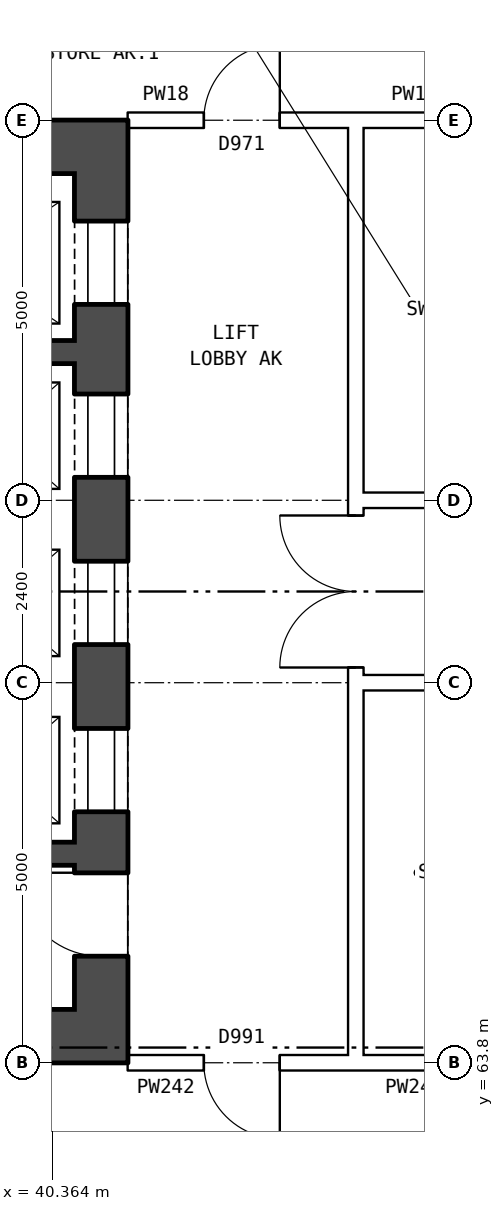
"""IFC4 building model, lengths in metres.
Left out: names, types, materials, properties, quantities, classifications, styles, units other than length and angle.
Written with IfcOpenShell. Run it as: python <this file> out.ifc"""

import sys

from ifc_helpers import new_model, si_unit, direction, frame, frame_2d, origin, place, context, subcontext, project, spatial, rectangle, extrude, element, fill, save


model = new_model("IFC4")
c1 = context("Model", 3, precision=1e-05, world=origin(), true_north=direction((0.0, 1.0)))
c2 = subcontext(c1, "Body", "Model", "MODEL_VIEW")
j1 = project(units=[si_unit("LENGTHUNIT", "METRE"), si_unit("PLANEANGLEUNIT", "RADIAN")], contexts=[c1])
p1 = place(None, origin())
s1 = spatial("IfcSite", under=j1, at=p1, CompositionType="ELEMENT")
p2 = place(p1, origin())
s2 = spatial("IfcBuilding", under=s1, at=p2, CompositionType="ELEMENT")
p3 = place(p2, frame((0.0, 0.0, 80.9)))
s3 = spatial("IfcBuildingStorey", under=s2, at=p3, CompositionType="ELEMENT", Elevation=80.9)
p4 = place(p3, frame((41.01, 75.5, 0.0), z_axis=(0.0, 0.0, 1.0), x_axis=(0.0, -1.0, 0.0)))
e1 = element("IfcWall", 1, at=p4, inside=s3, PredefinedType="SHEAR", context=c2, shape_type="SweptSolid", body=[
    extrude(rectangle(XDim=11.0, YDim=0.7, at=frame_2d((5.5, 0.0))), origin(), (0.0, 0.0, 1.0), 2.85),
])
p5 = place(p4, frame((0.625, 0.0, 0.0)))
e2 = element("IfcOpeningElement", 2, at=p5, cuts=e1, PredefinedType="OPENING", context=c2, shape_type="SweptSolid", body=[
    extrude(rectangle(XDim=1.1, YDim=2.1, at=frame_2d((0.55, 1.05))), frame((0.0, 0.36, 0.0), z_axis=(0.0, -1.0, 0.0), x_axis=(1.0, 0.0, 0.0)), (0.0, 0.0, 1.0), 0.72),
])
p6 = place(p4, frame((2.9, 0.0, 0.0)))
e3 = element("IfcOpeningElement", 3, at=p6, cuts=e1, PredefinedType="OPENING", context=c2, shape_type="SweptSolid", body=[
    extrude(rectangle(XDim=1.1, YDim=2.1, at=frame_2d((0.55, 1.05))), frame((0.0, 0.36, 0.0), z_axis=(0.0, -1.0, 0.0), x_axis=(1.0, 0.0, 0.0)), (0.0, 0.0, 1.0), 0.72),
])
p7 = place(p4, frame((5.1, 0.0, 0.0)))
e4 = element("IfcOpeningElement", 4, at=p7, cuts=e1, PredefinedType="OPENING", context=c2, shape_type="SweptSolid", body=[
    extrude(rectangle(XDim=1.1, YDim=2.1, at=frame_2d((0.55, 1.05))), frame((0.0, 0.36, 0.0), z_axis=(0.0, -1.0, 0.0), x_axis=(1.0, 0.0, 0.0)), (0.0, 0.0, 1.0), 0.72),
])
p8 = place(p4, frame((7.3, 0.0, 0.0)))
e5 = element("IfcOpeningElement", 5, at=p8, cuts=e1, PredefinedType="OPENING", context=c2, shape_type="SweptSolid", body=[
    extrude(rectangle(XDim=1.1, YDim=2.1, at=frame_2d((0.55, 1.05))), frame((0.0, 0.36, 0.0), z_axis=(0.0, -1.0, 0.0), x_axis=(1.0, 0.0, 0.0)), (0.0, 0.0, 1.0), 0.72),
])
p9 = place(p4, frame((9.2, 0.0, 0.0)))
e6 = element("IfcOpeningElement", 6, at=p9, cuts=e1, PredefinedType="OPENING", context=c2, shape_type="SweptSolid", body=[
    extrude(rectangle(XDim=1.1, YDim=2.1, at=frame_2d((0.55, 1.05))), frame((0.0, 0.36, 0.0), z_axis=(0.0, -1.0, 0.0), x_axis=(1.0, 0.0, 0.0)), (0.0, 0.0, 1.0), 0.72),
])
for number, where, z_axis, x_axis in (
    (7, (41.36, 75.85, 0.0), (0.0, 0.0, 1.0), (-1.0, 0.0, 0.0)),
    (8, (41.36, 64.15, 0.0), (0.0, 0.0, 1.0), (-1.0, 0.0, 0.0)),
):
    element("IfcWall", number, at=place(p3, frame(where, z_axis=z_axis, x_axis=x_axis)), inside=s3, PredefinedType="SHEAR", context=c2, shape_type="SweptSolid", body=[
        extrude(rectangle(XDim=9.0, YDim=0.7, at=frame_2d((4.5, 0.0))), origin(), (0.0, 0.0, 1.0), 2.85),
    ])
p10 = place(p3, frame((40.66, 73.15, 0.0), z_axis=(0.0, 0.0, 1.0), x_axis=(-1.0, 0.0, 0.0)))
e9 = element("IfcWall", 9, at=p10, inside=s3, PredefinedType="SHEAR", context=c2, shape_type="SweptSolid", body=[
    extrude(rectangle(XDim=3.32, YDim=0.3, at=frame_2d((1.66, 0.0))), origin(), (0.0, 0.0, 1.0), 2.85),
])
p11 = place(p3, frame((40.66, 66.55, 0.0), z_axis=(0.0, 0.0, 1.0), x_axis=(-1.0, 0.0, 0.0)))
e10 = element("IfcWall", 10, at=p11, inside=s3, PredefinedType="SHEAR", context=c2, shape_type="SweptSolid", body=[
    extrude(rectangle(XDim=2.2, YDim=0.3, at=frame_2d((1.1, 0.0))), origin(), (0.0, 0.0, 1.0), 2.85),
])
p12 = place(p3, frame((44.36, 63.9, 0.0), z_axis=(0.0, 0.0, 1.0), x_axis=(0.0, 1.0, 0.0)))
e11 = element("IfcWall", 11, at=p12, inside=s3, PredefinedType="PARTITIONING", context=c2, shape_type="SweptSolid", body=[
    extrude(rectangle(XDim=12.2, YDim=0.2, at=frame_2d((6.1, 0.0))), origin(), (0.0, 0.0, 1.0), 2.85),
])
p13 = place(p12, frame((5.1, 0.0, 0.0)))
e12 = element("IfcOpeningElement", 12, at=p13, cuts=e11, PredefinedType="OPENING", context=c2, shape_type="SweptSolid", body=[
    extrude(rectangle(XDim=2.0, YDim=2.1, at=frame_2d((1.0, 1.05))), frame((0.0, 0.11, 0.0), z_axis=(0.0, -1.0, 0.0), x_axis=(1.0, 0.0, 0.0)), (0.0, 0.0, 1.0), 0.22),
])
p14 = place(p3, frame((41.36, 63.8, 0.0), z_axis=(0.0, 0.0, 1.0), x_axis=(1.0, 0.0, 0.0)))
e13 = element("IfcWall", 13, at=p14, inside=s3, PredefinedType="PARTITIONING", context=c2, shape_type="SweptSolid", body=[
    extrude(rectangle(XDim=3.0, YDim=0.2, at=frame_2d((1.5, 0.0))), origin(), (0.0, 0.0, 1.0), 2.85),
])
p15 = place(p14, frame((1.0, 0.0, 0.0)))
e14 = element("IfcOpeningElement", 14, at=p15, cuts=e13, PredefinedType="OPENING", context=c2, shape_type="SweptSolid", body=[
    extrude(rectangle(XDim=1.0, YDim=2.1, at=frame_2d((0.5, 1.05))), frame((0.0, 0.11, 0.0), z_axis=(0.0, -1.0, 0.0), x_axis=(1.0, 0.0, 0.0)), (0.0, 0.0, 1.0), 0.22),
])
p16 = place(p3, frame((44.36, 63.8, 0.0), z_axis=(0.0, 0.0, 1.0), x_axis=(1.0, 0.0, 0.0)))
e15 = element("IfcWall", 15, at=p16, inside=s3, PredefinedType="PARTITIONING", context=c2, shape_type="SweptSolid", body=[
    extrude(rectangle(XDim=1.54, YDim=0.2, at=frame_2d((0.77, 0.0))), origin(), (0.0, 0.0, 1.0), 2.85),
])
p17 = place(p3, frame((44.36, 68.8, 0.0), z_axis=(0.0, 0.0, 1.0), x_axis=(1.0, 0.0, 0.0)))
e16 = element("IfcWall", 16, at=p17, inside=s3, PredefinedType="PARTITIONING", context=c2, shape_type="SweptSolid", body=[
    extrude(rectangle(XDim=19.28, YDim=0.2, at=frame_2d((9.64, 0.0))), origin(), (0.0, 0.0, 1.0), 2.85),
])
p18 = place(p17, frame((14.64, 0.0, 0.0)))
e17 = element("IfcOpeningElement", 17, at=p18, cuts=e16, PredefinedType="OPENING", context=c2, shape_type="SweptSolid", body=[
    extrude(rectangle(XDim=1.0, YDim=2.1, at=frame_2d((0.5, 1.05))), frame((0.0, 0.11, 0.0), z_axis=(0.0, -1.0, 0.0), x_axis=(1.0, 0.0, 0.0)), (0.0, 0.0, 1.0), 0.22),
])
p19 = place(p17, frame((11.64, 0.0, 0.0)))
e18 = element("IfcOpeningElement", 18, at=p19, cuts=e16, PredefinedType="OPENING", context=c2, shape_type="SweptSolid", body=[
    extrude(rectangle(XDim=1.0, YDim=2.1, at=frame_2d((0.5, 1.05))), frame((0.0, 0.11, 0.0), z_axis=(0.0, -1.0, 0.0), x_axis=(1.0, 0.0, 0.0)), (0.0, 0.0, 1.0), 0.22),
])
p20 = place(p17, frame((2.64, 0.0, 0.0)))
e19 = element("IfcOpeningElement", 19, at=p20, cuts=e16, PredefinedType="OPENING", context=c2, shape_type="SweptSolid", body=[
    extrude(rectangle(XDim=1.0, YDim=2.1, at=frame_2d((0.5, 1.05))), frame((0.0, 0.11, 0.0), z_axis=(0.0, -1.0, 0.0), x_axis=(1.0, 0.0, 0.0)), (0.0, 0.0, 1.0), 0.22),
])
p21 = place(p3, frame((44.36, 71.2, 0.0), z_axis=(0.0, 0.0, 1.0), x_axis=(1.0, 0.0, 0.0)))
e20 = element("IfcWall", 20, at=p21, inside=s3, PredefinedType="PARTITIONING", context=c2, shape_type="SweptSolid", body=[
    extrude(rectangle(XDim=19.28, YDim=0.2, at=frame_2d((9.64, 0.0))), origin(), (0.0, 0.0, 1.0), 2.85),
])
p22 = place(p21, frame((14.64, 0.0, 0.0)))
e21 = element("IfcOpeningElement", 21, at=p22, cuts=e20, PredefinedType="OPENING", context=c2, shape_type="SweptSolid", body=[
    extrude(rectangle(XDim=1.0, YDim=2.1, at=frame_2d((0.5, 1.05))), frame((0.0, 0.11, 0.0), z_axis=(0.0, -1.0, 0.0), x_axis=(1.0, 0.0, 0.0)), (0.0, 0.0, 1.0), 0.22),
])
p23 = place(p21, frame((8.64, 0.0, 0.0)))
e22 = element("IfcOpeningElement", 22, at=p23, cuts=e20, PredefinedType="OPENING", context=c2, shape_type="SweptSolid", body=[
    extrude(rectangle(XDim=1.0, YDim=2.1, at=frame_2d((0.5, 1.05))), frame((0.0, 0.11, 0.0), z_axis=(0.0, -1.0, 0.0), x_axis=(1.0, 0.0, 0.0)), (0.0, 0.0, 1.0), 0.22),
])
p24 = place(p21, frame((2.64, 0.0, 0.0)))
e23 = element("IfcOpeningElement", 23, at=p24, cuts=e20, PredefinedType="OPENING", context=c2, shape_type="SweptSolid", body=[
    extrude(rectangle(XDim=1.0, YDim=2.1, at=frame_2d((0.5, 1.05))), frame((0.0, 0.11, 0.0), z_axis=(0.0, -1.0, 0.0), x_axis=(1.0, 0.0, 0.0)), (0.0, 0.0, 1.0), 0.22),
])
p25 = place(p3, frame((41.36, 76.2, 0.0), z_axis=(0.0, 0.0, 1.0), x_axis=(1.0, 0.0, 0.0)))
e24 = element("IfcWall", 24, at=p25, inside=s3, PredefinedType="PARTITIONING", context=c2, shape_type="SweptSolid", body=[
    extrude(rectangle(XDim=3.0, YDim=0.2, at=frame_2d((1.5, 0.0))), origin(), (0.0, 0.0, 1.0), 2.85),
])
p26 = place(p25, frame((1.0, 0.0, 0.0)))
e25 = element("IfcOpeningElement", 25, at=p26, cuts=e24, PredefinedType="OPENING", context=c2, shape_type="SweptSolid", body=[
    extrude(rectangle(XDim=1.0, YDim=2.1, at=frame_2d((0.5, 1.05))), frame((0.0, 0.11, 0.0), z_axis=(0.0, -1.0, 0.0), x_axis=(1.0, 0.0, 0.0)), (0.0, 0.0, 1.0), 0.22),
])
p27 = place(p3, frame((44.36, 76.2, 0.0), z_axis=(0.0, 0.0, 1.0), x_axis=(1.0, 0.0, 0.0)))
e26 = element("IfcWall", 26, at=p27, inside=s3, PredefinedType="PARTITIONING", context=c2, shape_type="SweptSolid", body=[
    extrude(rectangle(XDim=1.54, YDim=0.2, at=frame_2d((0.77, 0.0))), origin(), (0.0, 0.0, 1.0), 2.85),
])
p28 = place(p5, origin())
e27 = element("IfcDoor", 27, at=p28, inside=s3, OperationType="DOUBLE_DOOR_SLIDING", PredefinedType="DOOR", context=c2, shape_type="SweptSolid", body=[
    extrude(rectangle(XDim=1.1, YDim=2.1, at=frame_2d((0.55, 1.05))), frame((0.0, -0.285, 0.0), z_axis=(0.0, -1.0, 0.0), x_axis=(1.0, 0.0, 0.0)), (0.0, 0.0, 1.0), 0.05),
])
fill(e2, e27)
p29 = place(p6, origin())
e28 = element("IfcDoor", 28, at=p29, inside=s3, OperationType="DOUBLE_DOOR_SLIDING", PredefinedType="DOOR", context=c2, shape_type="SweptSolid", body=[
    extrude(rectangle(XDim=1.1, YDim=2.1, at=frame_2d((0.55, 1.05))), frame((0.0, -0.285, 0.0), z_axis=(0.0, -1.0, 0.0), x_axis=(1.0, 0.0, 0.0)), (0.0, 0.0, 1.0), 0.05),
])
fill(e3, e28)
p30 = place(p7, origin())
e29 = element("IfcDoor", 29, at=p30, inside=s3, OperationType="DOUBLE_DOOR_SLIDING", PredefinedType="DOOR", context=c2, shape_type="SweptSolid", body=[
    extrude(rectangle(XDim=1.1, YDim=2.1, at=frame_2d((0.55, 1.05))), frame((0.0, -0.285, 0.0), z_axis=(0.0, -1.0, 0.0), x_axis=(1.0, 0.0, 0.0)), (0.0, 0.0, 1.0), 0.05),
])
fill(e4, e29)
p31 = place(p8, origin())
e30 = element("IfcDoor", 30, at=p31, inside=s3, OperationType="DOUBLE_DOOR_SLIDING", PredefinedType="DOOR", context=c2, shape_type="SweptSolid", body=[
    extrude(rectangle(XDim=1.1, YDim=2.1, at=frame_2d((0.55, 1.05))), frame((0.0, -0.285, 0.0), z_axis=(0.0, -1.0, 0.0), x_axis=(1.0, 0.0, 0.0)), (0.0, 0.0, 1.0), 0.05),
])
fill(e5, e30)
p32 = place(p9, frame((1.1, 0.0, 0.0), z_axis=(0.0, 0.0, 1.0), x_axis=(-1.0, 0.0, 0.0)))
e31 = element("IfcDoor", 31, at=p32, inside=s3, OperationType="SINGLE_SWING_RIGHT", PredefinedType="DOOR", context=c2, shape_type="SweptSolid", body=[
    extrude(rectangle(XDim=1.1, YDim=2.1, at=frame_2d((0.55, 1.05))), frame((0.0, 0.335, 0.0), z_axis=(0.0, -1.0, 0.0), x_axis=(1.0, 0.0, 0.0)), (0.0, 0.0, 1.0), 0.05),
])
fill(e6, e31)
p33 = place(p13, origin())
e32 = element("IfcDoor", 32, at=p33, inside=s3, OperationType="DOUBLE_DOOR_SINGLE_SWING", PredefinedType="DOOR", context=c2, shape_type="SweptSolid", body=[
    extrude(rectangle(XDim=2.0, YDim=2.1, at=frame_2d((1.0, 1.05))), frame((0.0, 0.025, 0.0), z_axis=(0.0, -1.0, 0.0), x_axis=(1.0, 0.0, 0.0)), (0.0, 0.0, 1.0), 0.05),
])
fill(e12, e32)
p34 = place(p15, frame((1.0, 0.0, 0.0), z_axis=(0.0, 0.0, 1.0), x_axis=(-1.0, 0.0, 0.0)))
e33 = element("IfcDoor", 33, at=p34, inside=s3, OperationType="SINGLE_SWING_LEFT", PredefinedType="DOOR", context=c2, shape_type="SweptSolid", body=[
    extrude(rectangle(XDim=1.0, YDim=2.1, at=frame_2d((0.5, 1.05))), frame((0.0, 0.025, 0.0), z_axis=(0.0, -1.0, 0.0), x_axis=(1.0, 0.0, 0.0)), (0.0, 0.0, 1.0), 0.05),
])
fill(e14, e33)
p35 = place(p26, origin())
e34 = element("IfcDoor", 34, at=p35, inside=s3, OperationType="SINGLE_SWING_RIGHT", PredefinedType="DOOR", context=c2, shape_type="SweptSolid", body=[
    extrude(rectangle(XDim=1.0, YDim=2.1, at=frame_2d((0.5, 1.05))), frame((0.0, 0.025, 0.0), z_axis=(0.0, -1.0, 0.0), x_axis=(1.0, 0.0, 0.0)), (0.0, 0.0, 1.0), 0.05),
])
fill(e25, e34)
save(model, sys.argv[1])
